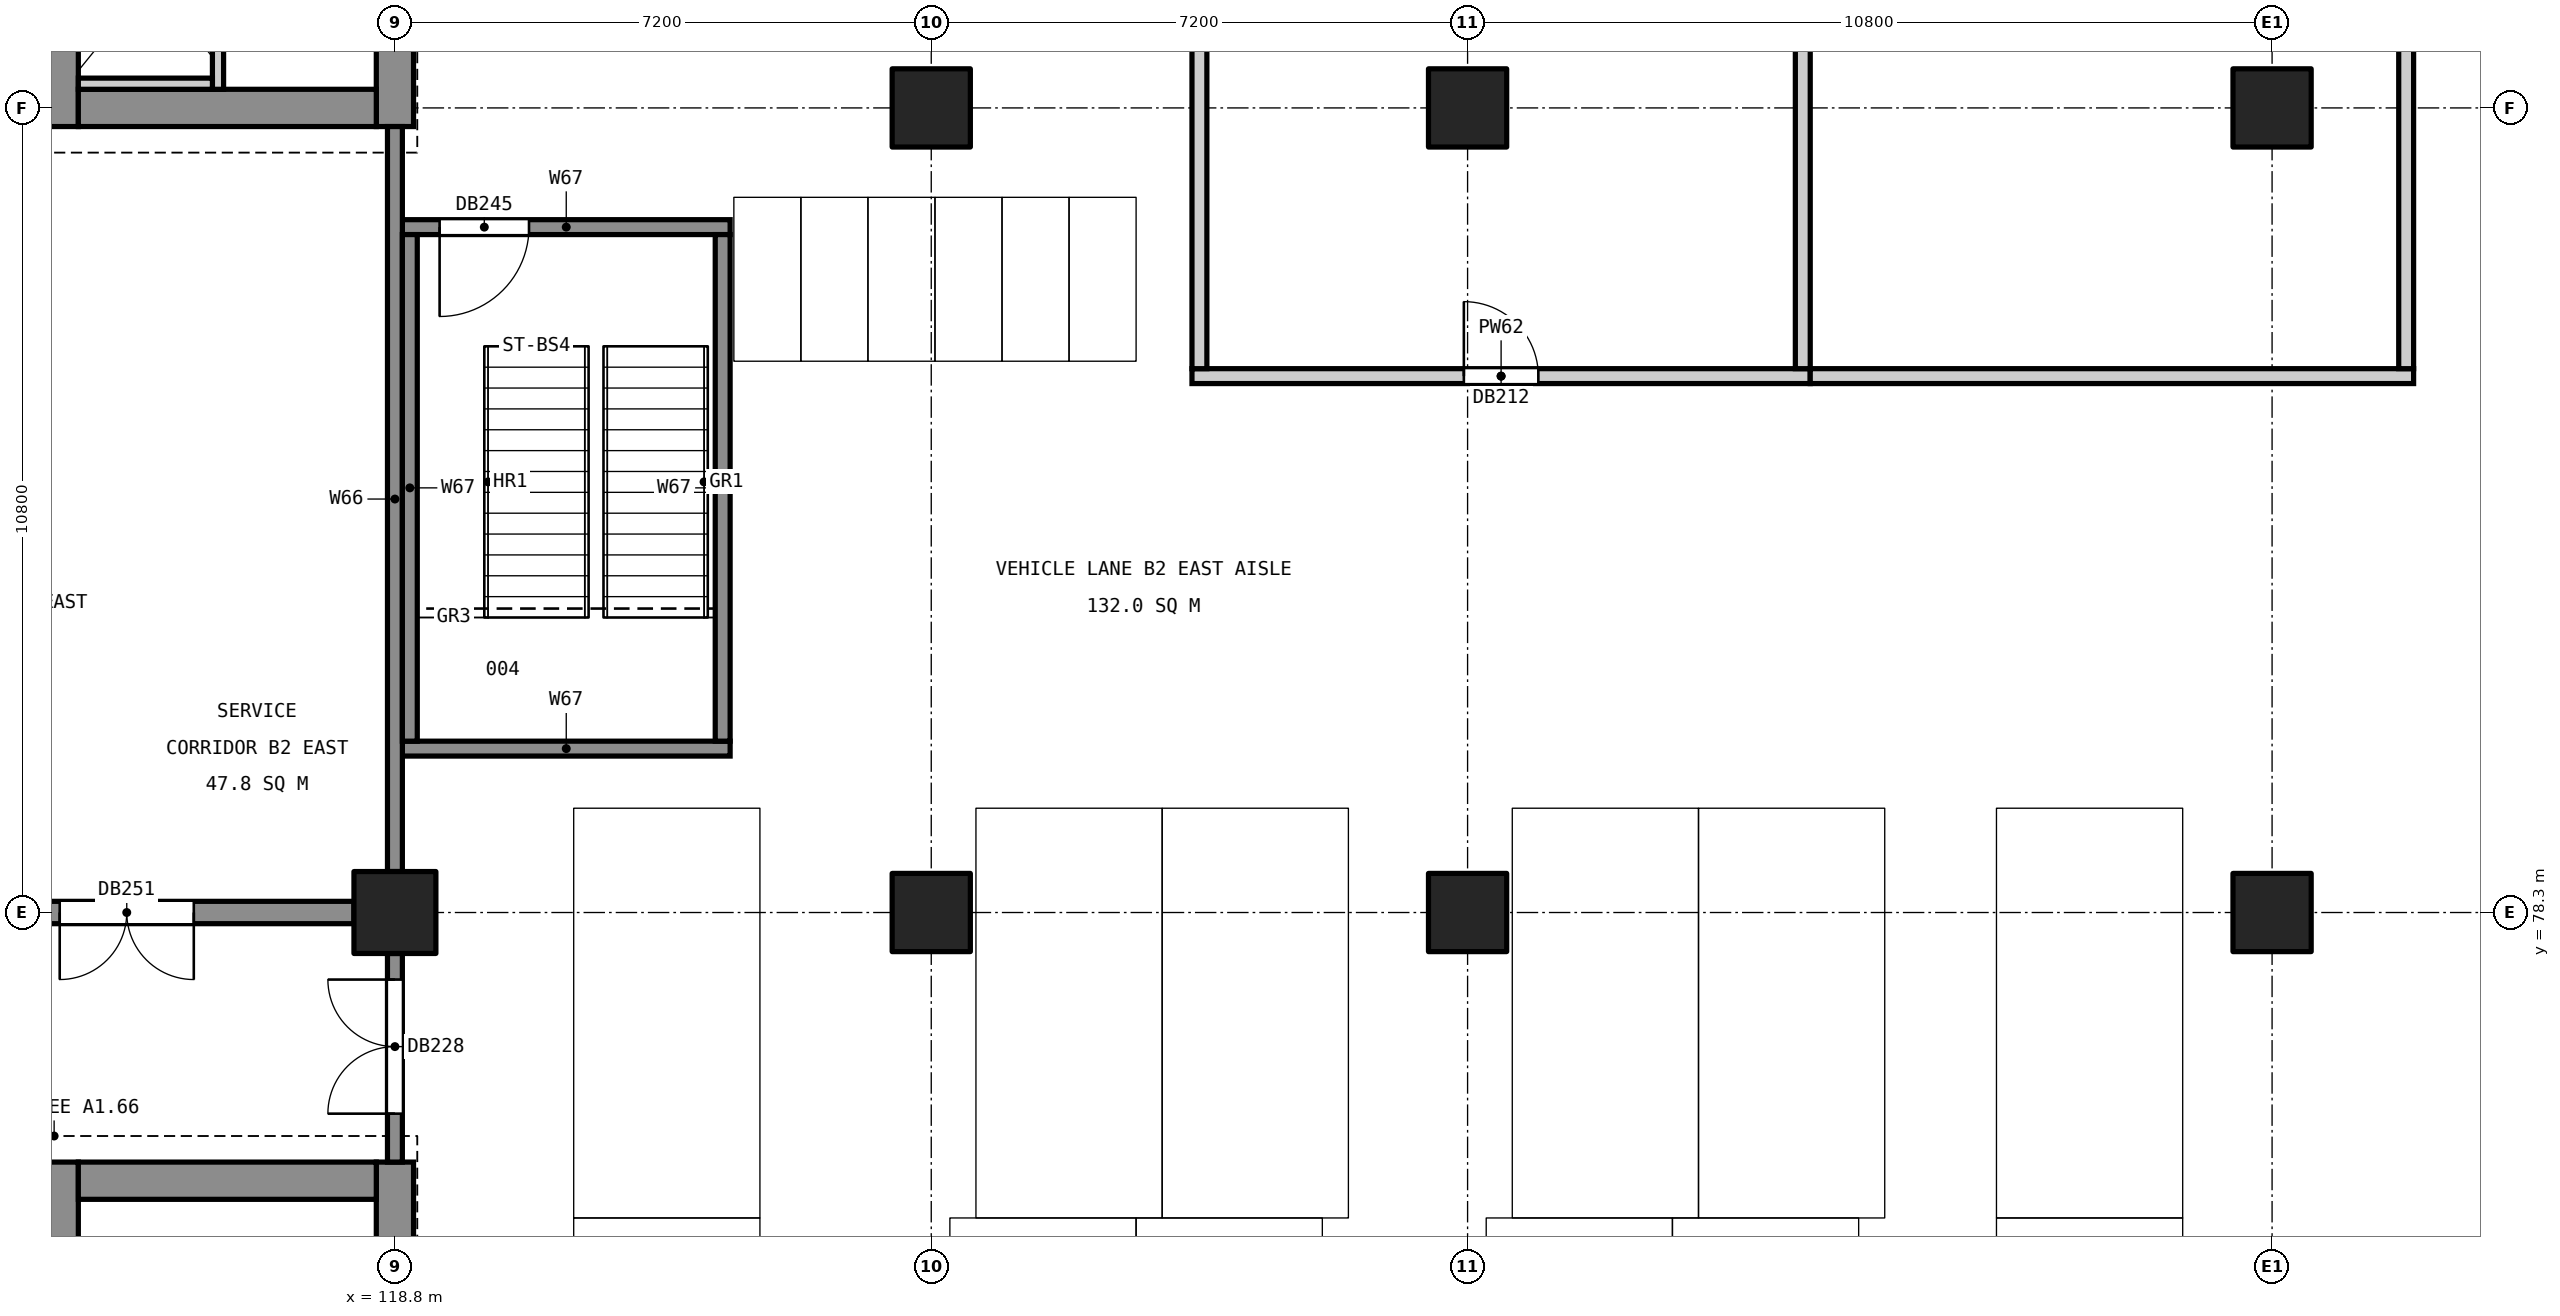
"""IFC4 building model, lengths in metres.
Left out: names, types, materials, properties, quantities, classifications, styles, units other than length and angle.
Written with IfcOpenShell. Run it as: python <this file> out.ifc"""

import sys

from ifc_helpers import new_model, si_unit, direction, frame, frame_2d, origin, origin_2d, place, context, subcontext, project, spatial, rectangle, extrude, element, fill, save


model = new_model("IFC4")
c1 = context("Model", 3, precision=1e-05, world=origin(), true_north=direction((0.0, 1.0)))
c2 = subcontext(c1, "Body", "Model", "MODEL_VIEW")
j1 = project(units=[si_unit("LENGTHUNIT", "METRE"), si_unit("PLANEANGLEUNIT", "RADIAN")], contexts=[c1])
p1 = place(None, origin())
s1 = spatial("IfcSite", under=j1, at=p1, CompositionType="ELEMENT")
p2 = place(p1, origin())
s2 = spatial("IfcBuilding", under=s1, at=p2, CompositionType="ELEMENT")
p3 = place(p2, frame((0.0, 0.0, -9.6)))
s3 = spatial("IfcBuildingStorey", under=s2, at=p3, CompositionType="ELEMENT", Elevation=-9.6)
p4 = place(p3, frame((118.8, 78.3, 0.0), z_axis=(0.0, 0.0, 1.0), x_axis=(1.0, 0.0, 0.0)))
e1 = element("IfcColumn", 1, at=p4, inside=s3, PredefinedType="COLUMN", context=c2, shape_type="SweptSolid", body=[
    extrude(rectangle(XDim=1.1, YDim=1.1, at=origin_2d()), origin(), (0.0, 0.0, 1.0), 4.35),
])
for number, where, z_axis, x_axis in (
    (2, (126.0, 78.3, 0.0), (0.0, 0.0, 1.0), (1.0, 0.0, 0.0)),
    (3, (126.0, 89.1, 0.0), (0.0, 0.0, 1.0), (1.0, 0.0, 0.0)),
    (4, (133.2, 78.3, 0.0), (0.0, 0.0, 1.0), (1.0, 0.0, 0.0)),
    (5, (133.2, 89.1, 0.0), (0.0, 0.0, 1.0), (1.0, 0.0, 0.0)),
    (6, (144.0, 78.3, 0.0), (0.0, 0.0, 1.0), (1.0, 0.0, 0.0)),
    (7, (144.0, 89.1, 0.0), (0.0, 0.0, 1.0), (1.0, 0.0, 0.0)),
):
    element("IfcColumn", number, at=place(p3, frame(where, z_axis=z_axis, x_axis=x_axis)), inside=s3, PredefinedType="COLUMN", context=c2, shape_type="SweptSolid", body=[
        extrude(rectangle(XDim=1.05, YDim=1.05, at=origin_2d()), origin(), (0.0, 0.0, 1.0), 4.35),
    ])
p5 = place(p3, frame((118.8, 60.05, 0.0), z_axis=(0.0, 0.0, 1.0), x_axis=(0.0, 1.0, 0.0)))
e8 = element("IfcWall", 8, at=p5, inside=s3, PredefinedType="SHEAR", context=c2, shape_type="SweptSolid", body=[
    extrude(rectangle(XDim=14.9, YDim=0.5, at=frame_2d((7.45, 0.0))), origin(), (0.0, 0.0, 1.0), 4.35),
])
p6 = place(p3, frame((114.3, 60.05, 0.0), z_axis=(0.0, 0.0, 1.0), x_axis=(0.0, 1.0, 0.0)))
e9 = element("IfcWall", 9, at=p6, inside=s3, PredefinedType="SHEAR", context=c2, shape_type="SweptSolid", body=[
    extrude(rectangle(XDim=14.9, YDim=0.5, at=frame_2d((7.45, 0.0))), origin(), (0.0, 0.0, 1.0), 4.35),
])
p7 = place(p6, frame((8.85, 0.0, 0.0)))
e10 = element("IfcOpeningElement", 10, at=p7, cuts=e9, PredefinedType="OPENING", context=c2, shape_type="SweptSolid", body=[
    extrude(rectangle(XDim=1.1, YDim=2.1, at=frame_2d((0.55, 1.05))), frame((0.0, 0.26, 0.0), z_axis=(0.0, -1.0, 0.0), x_axis=(1.0, 0.0, 0.0)), (0.0, 0.0, 1.0), 0.52),
])
p8 = place(p6, frame((11.4, 0.0, 0.0)))
e11 = element("IfcOpeningElement", 11, at=p8, cuts=e9, PredefinedType="OPENING", context=c2, shape_type="SweptSolid", body=[
    extrude(rectangle(XDim=1.1, YDim=2.1, at=frame_2d((0.55, 1.05))), frame((0.0, 0.26, 0.0), z_axis=(0.0, -1.0, 0.0), x_axis=(1.0, 0.0, 0.0)), (0.0, 0.0, 1.0), 0.52),
])
p9 = place(p6, frame((3.75, 0.0, 0.0)))
e12 = element("IfcOpeningElement", 12, at=p9, cuts=e9, PredefinedType="OPENING", context=c2, shape_type="SweptSolid", body=[
    extrude(rectangle(XDim=1.0, YDim=2.1, at=frame_2d((0.5, 1.05))), frame((0.0, 0.26, 0.0), z_axis=(0.0, -1.0, 0.0), x_axis=(1.0, 0.0, 0.0)), (0.0, 0.0, 1.0), 0.52),
])
p10 = place(p3, frame((118.55, 74.7, 0.0), z_axis=(0.0, 0.0, 1.0), x_axis=(-1.0, 0.0, 0.0)))
e13 = element("IfcWall", 13, at=p10, inside=s3, PredefinedType="SHEAR", context=c2, shape_type="SweptSolid", body=[
    extrude(rectangle(XDim=4.0, YDim=0.5, at=frame_2d((2.0, 0.0))), origin(), (0.0, 0.0, 1.0), 4.35),
])
p11 = place(p3, frame((118.8, 88.85, 0.0), z_axis=(0.0, 0.0, 1.0), x_axis=(0.0, 1.0, 0.0)))
e14 = element("IfcWall", 14, at=p11, inside=s3, PredefinedType="SHEAR", context=c2, shape_type="SweptSolid", body=[
    extrude(rectangle(XDim=11.3, YDim=0.5, at=frame_2d((5.65, 0.0))), origin(), (0.0, 0.0, 1.0), 4.35),
])
p12 = place(p3, frame((114.3, 88.85, 0.0), z_axis=(0.0, 0.0, 1.0), x_axis=(0.0, 1.0, 0.0)))
e15 = element("IfcWall", 15, at=p12, inside=s3, PredefinedType="SHEAR", context=c2, shape_type="SweptSolid", body=[
    extrude(rectangle(XDim=11.3, YDim=0.5, at=frame_2d((5.65, 0.0))), origin(), (0.0, 0.0, 1.0), 4.35),
])
p13 = place(p12, frame((1.4, 0.0, 0.0)))
e16 = element("IfcOpeningElement", 16, at=p13, cuts=e15, PredefinedType="OPENING", context=c2, shape_type="SweptSolid", body=[
    extrude(rectangle(XDim=1.1, YDim=2.1, at=frame_2d((0.55, 1.05))), frame((0.0, 0.26, 0.0), z_axis=(0.0, -1.0, 0.0), x_axis=(1.0, 0.0, 0.0)), (0.0, 0.0, 1.0), 0.52),
])
p14 = place(p12, frame((6.55, 0.0, 0.0)))
e17 = element("IfcOpeningElement", 17, at=p14, cuts=e15, PredefinedType="OPENING", context=c2, shape_type="SweptSolid", body=[
    extrude(rectangle(XDim=1.0, YDim=2.1, at=frame_2d((0.5, 1.05))), frame((0.0, 0.26, 0.0), z_axis=(0.0, -1.0, 0.0), x_axis=(1.0, 0.0, 0.0)), (0.0, 0.0, 1.0), 0.52),
])
p15 = place(p3, frame((118.55, 89.1, 0.0), z_axis=(0.0, 0.0, 1.0), x_axis=(-1.0, 0.0, 0.0)))
e18 = element("IfcWall", 18, at=p15, inside=s3, PredefinedType="SHEAR", context=c2, shape_type="SweptSolid", body=[
    extrude(rectangle(XDim=4.0, YDim=0.5, at=frame_2d((2.0, 0.0))), origin(), (0.0, 0.0, 1.0), 4.35),
])
p16 = place(p3, frame((118.25, 78.3, 0.0), z_axis=(0.0, 0.0, 1.0), x_axis=(-1.0, 0.0, 0.0)))
e19 = element("IfcWall", 19, at=p16, inside=s3, PredefinedType="SHEAR", context=c2, shape_type="SweptSolid", body=[
    extrude(rectangle(XDim=6.1, YDim=0.3, at=frame_2d((3.05, 0.0))), origin(), (0.0, 0.0, 1.0), 4.35),
])
p17 = place(p16, frame((2.15, 0.0, 0.0)))
e20 = element("IfcOpeningElement", 20, at=p17, cuts=e19, PredefinedType="OPENING", context=c2, shape_type="SweptSolid", body=[
    extrude(rectangle(XDim=1.8, YDim=2.1, at=frame_2d((0.9, 1.05))), frame((0.0, 0.16, 0.0), z_axis=(0.0, -1.0, 0.0), x_axis=(1.0, 0.0, 0.0)), (0.0, 0.0, 1.0), 0.32),
])
p18 = place(p3, frame((116.425, 92.0, 0.0), z_axis=(0.0, 0.0, 1.0), x_axis=(0.0, -1.0, 0.0)))
e21 = element("IfcWall", 21, at=p18, inside=s3, PredefinedType="SOLIDWALL", context=c2, shape_type="SweptSolid", body=[
    extrude(rectangle(XDim=2.65, YDim=0.15, at=frame_2d((1.325, 0.0))), origin(), (0.0, 0.0, 1.0), 4.8),
])
p19 = place(p3, frame((116.35, 89.425, 0.0), z_axis=(0.0, 0.0, 1.0), x_axis=(-1.0, 0.0, 0.0)))
e22 = element("IfcWall", 22, at=p19, inside=s3, PredefinedType="SOLIDWALL", context=c2, shape_type="SweptSolid", body=[
    extrude(rectangle(XDim=1.8, YDim=0.15, at=frame_2d((0.9, 0.0))), origin(), (0.0, 0.0, 1.0), 4.8),
])
p20 = place(p3, frame((118.9, 80.5, 0.0), z_axis=(0.0, 0.0, 1.0), x_axis=(1.0, 0.0, 0.0)))
e23 = element("IfcWall", 23, at=p20, inside=s3, PredefinedType="SOLIDWALL", context=c2, shape_type="SweptSolid", body=[
    extrude(rectangle(XDim=4.4, YDim=0.2, at=frame_2d((2.2, 0.0))), origin(), (0.0, 0.0, 1.0), 4.35),
])
p21 = place(p3, frame((129.5, 85.5, 0.0), z_axis=(0.0, 0.0, 1.0), x_axis=(1.0, 0.0, 0.0)))
e24 = element("IfcWall", 24, at=p21, inside=s3, PredefinedType="PARTITIONING", context=c2, shape_type="SweptSolid", body=[
    extrude(rectangle(XDim=8.3, YDim=0.2, at=frame_2d((4.15, 0.0))), origin(), (0.0, 0.0, 1.0), 4.35),
])
p22 = place(p21, frame((3.65, 0.0, 0.0)))
e25 = element("IfcOpeningElement", 25, at=p22, cuts=e24, PredefinedType="OPENING", context=c2, shape_type="SweptSolid", body=[
    extrude(rectangle(XDim=1.0, YDim=2.1, at=frame_2d((0.5, 1.05))), frame((0.0, 0.11, 0.0), z_axis=(0.0, -1.0, 0.0), x_axis=(1.0, 0.0, 0.0)), (0.0, 0.0, 1.0), 0.22),
])
p23 = place(p3, frame((137.8, 85.5, 0.0), z_axis=(0.0, 0.0, 1.0), x_axis=(1.0, 0.0, 0.0)))
e26 = element("IfcWall", 26, at=p23, inside=s3, PredefinedType="PARTITIONING", context=c2, shape_type="SweptSolid", body=[
    extrude(rectangle(XDim=8.1, YDim=0.2, at=frame_2d((4.05, 0.0))), origin(), (0.0, 0.0, 1.0), 4.35),
])
p24 = place(p3, frame((118.9, 87.5, 0.0), z_axis=(0.0, 0.0, 1.0), x_axis=(1.0, 0.0, 0.0)))
e27 = element("IfcWall", 27, at=p24, inside=s3, PredefinedType="SOLIDWALL", context=c2, shape_type="SweptSolid", body=[
    extrude(rectangle(XDim=4.4, YDim=0.2, at=frame_2d((2.2, 0.0))), origin(), (0.0, 0.0, 1.0), 4.35),
])
p25 = place(p24, frame((0.5, 0.0, 0.0)))
e28 = element("IfcOpeningElement", 28, at=p25, cuts=e27, PredefinedType="OPENING", context=c2, shape_type="SweptSolid", body=[
    extrude(rectangle(XDim=1.2, YDim=2.1, at=frame_2d((0.6, 1.05))), frame((0.0, 0.11, 0.0), z_axis=(0.0, -1.0, 0.0), x_axis=(1.0, 0.0, 0.0)), (0.0, 0.0, 1.0), 0.22),
])
p26 = place(p3, frame((118.8, 74.95, 0.0), z_axis=(0.0, 0.0, 1.0), x_axis=(0.0, 1.0, 0.0)))
e29 = element("IfcWall", 29, at=p26, inside=s3, PredefinedType="SOLIDWALL", context=c2, shape_type="SweptSolid", body=[
    extrude(rectangle(XDim=2.8, YDim=0.2, at=frame_2d((1.4, 0.0))), origin(), (0.0, 0.0, 1.0), 4.35),
])
p27 = place(p26, frame((0.65, 0.0, 0.0)))
e30 = element("IfcOpeningElement", 30, at=p27, cuts=e29, PredefinedType="OPENING", context=c2, shape_type="SweptSolid", body=[
    extrude(rectangle(XDim=1.8, YDim=2.1, at=frame_2d((0.9, 1.05))), frame((0.0, 0.11, 0.0), z_axis=(0.0, -1.0, 0.0), x_axis=(1.0, 0.0, 0.0)), (0.0, 0.0, 1.0), 0.22),
])
p28 = place(p3, frame((118.8, 78.85, 0.0), z_axis=(0.0, 0.0, 1.0), x_axis=(0.0, 1.0, 0.0)))
e31 = element("IfcWall", 31, at=p28, inside=s3, PredefinedType="SOLIDWALL", context=c2, shape_type="SweptSolid", body=[
    extrude(rectangle(XDim=10.0, YDim=0.2, at=frame_2d((5.0, 0.0))), origin(), (0.0, 0.0, 1.0), 4.35),
])
for number, where, z_axis, x_axis in (
    (32, (119.0, 80.6, 0.0), (0.0, 0.0, 1.0), (0.0, 1.0, 0.0)),
    (33, (123.2, 80.6, 0.0), (0.0, 0.0, 1.0), (0.0, 1.0, 0.0)),
):
    element("IfcWall", number, at=place(p3, frame(where, z_axis=z_axis, x_axis=x_axis)), inside=s3, PredefinedType="SOLIDWALL", context=c2, shape_type="SweptSolid", body=[
        extrude(rectangle(XDim=6.8, YDim=0.2, at=frame_2d((3.4, 0.0))), origin(), (0.0, 0.0, 1.0), 4.35),
    ])
for number, where, z_axis, x_axis in (
    (34, (129.6, 85.6, 0.0), (0.0, 0.0, 1.0), (0.0, 1.0, 0.0)),
    (35, (137.7, 85.6, 0.0), (0.0, 0.0, 1.0), (0.0, 1.0, 0.0)),
):
    element("IfcWall", number, at=place(p3, frame(where, z_axis=z_axis, x_axis=x_axis)), inside=s3, PredefinedType="PARTITIONING", context=c2, shape_type="SweptSolid", body=[
        extrude(rectangle(XDim=14.0, YDim=0.2, at=frame_2d((7.0, 0.0))), origin(), (0.0, 0.0, 1.0), 4.35),
    ])
p29 = place(p3, frame((145.8, 85.6, 0.0), z_axis=(0.0, 0.0, 1.0), x_axis=(0.0, 1.0, 0.0)))
e36 = element("IfcWall", 36, at=p29, inside=s3, PredefinedType="PARTITIONING", context=c2, shape_type="SweptSolid", body=[
    extrude(rectangle(XDim=14.0, YDim=0.2, at=frame_2d((7.0, 0.0))), origin(), (0.0, 0.0, 1.0), 4.35),
])
p30 = place(p29, frame((6.5, 0.0, 0.0)))
e37 = element("IfcOpeningElement", 37, at=p30, cuts=e36, PredefinedType="OPENING", context=c2, shape_type="SweptSolid", body=[
    extrude(rectangle(XDim=1.0, YDim=2.1, at=frame_2d((0.5, 1.05))), frame((0.0, 0.11, 0.0), z_axis=(0.0, -1.0, 0.0), x_axis=(1.0, 0.0, 0.0)), (0.0, 0.0, 1.0), 0.22),
])
p31 = place(p22, origin())
e38 = element("IfcDoor", 38, at=p31, inside=s3, OperationType="SINGLE_SWING_LEFT", PredefinedType="DOOR", context=c2, shape_type="SweptSolid", body=[
    extrude(rectangle(XDim=1.0, YDim=2.1, at=frame_2d((0.5, 1.05))), frame((0.0, 0.025, 0.0), z_axis=(0.0, -1.0, 0.0), x_axis=(1.0, 0.0, 0.0)), (0.0, 0.0, 1.0), 0.05),
])
fill(e25, e38)
p32 = place(p27, origin())
e39 = element("IfcDoor", 39, at=p32, inside=s3, OperationType="DOUBLE_DOOR_SINGLE_SWING", PredefinedType="DOOR", context=c2, shape_type="SweptSolid", body=[
    extrude(rectangle(XDim=1.8, YDim=2.1, at=frame_2d((0.9, 1.05))), frame((0.0, 0.025, 0.0), z_axis=(0.0, -1.0, 0.0), x_axis=(1.0, 0.0, 0.0)), (0.0, 0.0, 1.0), 0.05),
])
fill(e30, e39)
p33 = place(p25, frame((1.2, 0.0, 0.0), z_axis=(0.0, 0.0, 1.0), x_axis=(-1.0, 0.0, 0.0)))
e40 = element("IfcDoor", 40, at=p33, inside=s3, OperationType="SINGLE_SWING_RIGHT", PredefinedType="DOOR", context=c2, shape_type="SweptSolid", body=[
    extrude(rectangle(XDim=1.2, YDim=2.1, at=frame_2d((0.6, 1.05))), frame((0.0, 0.025, 0.0), z_axis=(0.0, -1.0, 0.0), x_axis=(1.0, 0.0, 0.0)), (0.0, 0.0, 1.0), 0.05),
])
fill(e28, e40)
p34 = place(p17, origin())
e41 = element("IfcDoor", 41, at=p34, inside=s3, OperationType="DOUBLE_DOOR_SINGLE_SWING", PredefinedType="DOOR", context=c2, shape_type="SweptSolid", body=[
    extrude(rectangle(XDim=1.8, YDim=2.1, at=frame_2d((0.9, 1.05))), frame((0.0, 0.025, 0.0), z_axis=(0.0, -1.0, 0.0), x_axis=(1.0, 0.0, 0.0)), (0.0, 0.0, 1.0), 0.05),
])
fill(e20, e41)
save(model, sys.argv[1])
